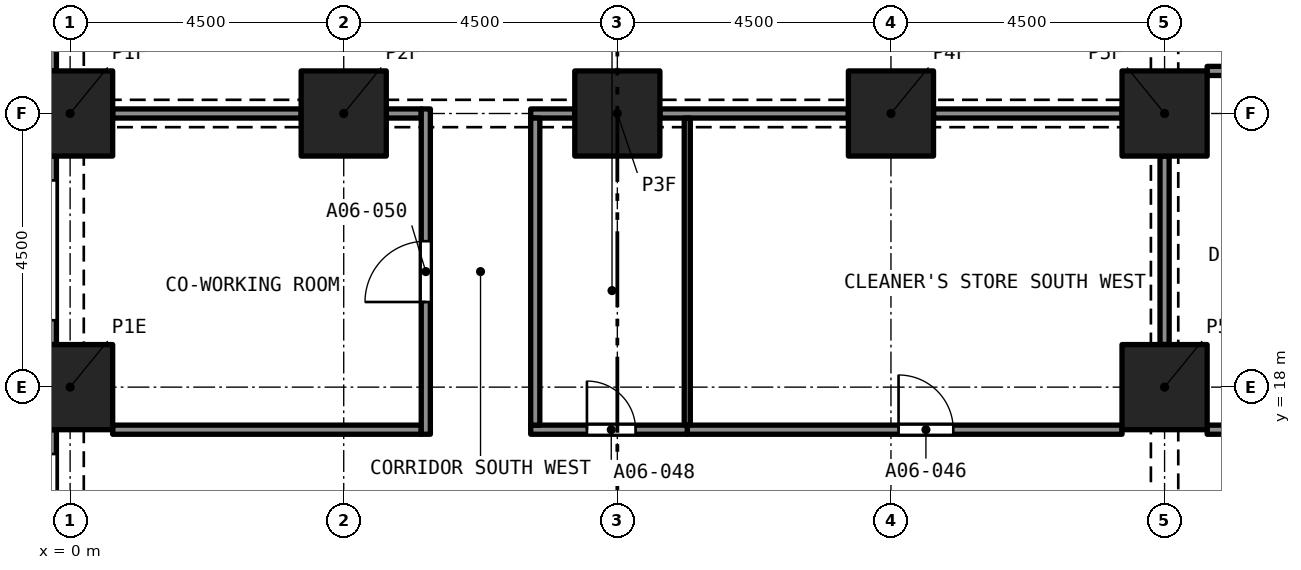
"""IFC4 building model, lengths in metres.
Left out: names, types, materials, properties, quantities, classifications, styles, units other than length and angle.
Written with IfcOpenShell. Run it as: python <this file> out.ifc"""

import sys

from ifc_helpers import new_model, si_unit, direction, frame, frame_2d, origin, origin_2d, place, context, subcontext, project, spatial, rectangle, extrude, element, fill, save


model = new_model("IFC4")
c1 = context("Model", 3, precision=1e-05, world=origin(), true_north=direction((0.0, 1.0)))
c2 = subcontext(c1, "Body", "Model", "MODEL_VIEW")
j1 = project(units=[si_unit("LENGTHUNIT", "METRE"), si_unit("PLANEANGLEUNIT", "RADIAN")], contexts=[c1])
p1 = place(None, origin())
s1 = spatial("IfcSite", under=j1, at=p1, CompositionType="ELEMENT")
p2 = place(p1, origin())
s2 = spatial("IfcBuilding", under=s1, at=p2, CompositionType="ELEMENT")
p3 = place(p2, frame((0.0, 0.0, 30.4)))
s3 = spatial("IfcBuildingStorey", under=s2, at=p3, CompositionType="ELEMENT", Elevation=30.4)
for number, where, z_axis, x_axis in (
    (1, (0.0, 18.0, 0.0), (0.0, 0.0, 1.0), (1.0, 0.0, 0.0)),
    (2, (18.0, 18.0, 0.0), (0.0, 0.0, 1.0), (1.0, 0.0, 0.0)),
    (3, (0.0, 22.5, 0.0), (0.0, 0.0, 1.0), (1.0, 0.0, 0.0)),
    (4, (4.5, 22.5, 0.0), (0.0, 0.0, 1.0), (1.0, 0.0, 0.0)),
    (5, (9.0, 22.5, 0.0), (0.0, 0.0, 1.0), (1.0, 0.0, 0.0)),
    (6, (13.5, 22.5, 0.0), (0.0, 0.0, 1.0), (1.0, 0.0, 0.0)),
    (7, (18.0, 22.5, 0.0), (0.0, 0.0, 1.0), (1.0, 0.0, 0.0)),
):
    element("IfcColumn", number, at=place(p3, frame(where, z_axis=z_axis, x_axis=x_axis)), inside=s3, PredefinedType="COLUMN", context=c2, shape_type="SweptSolid", body=[
        extrude(rectangle(XDim=1.4, YDim=1.4, at=origin_2d()), origin(), (0.0, 0.0, 1.0), 3.2),
    ])
p4 = place(p3, frame((-0.375, 23.2, 0.0), z_axis=(0.0, 0.0, 1.0), x_axis=(0.0, 1.0, 0.0)))
e8 = element("IfcWall", 8, at=p4, inside=s3, PredefinedType="SOLIDWALL", context=c2, shape_type="SweptSolid", body=[
    extrude(rectangle(XDim=3.1, YDim=0.3, at=frame_2d((1.55, 0.0))), origin(), (0.0, 0.0, 1.0), 3.2),
])
p5 = place(p4, frame((0.4, 0.0, 0.45)))
e9 = element("IfcOpeningElement", 9, at=p5, cuts=e8, PredefinedType="OPENING", context=c2, shape_type="SweptSolid", body=[
    extrude(rectangle(XDim=2.3, YDim=1.95, at=frame_2d((1.15, 0.975))), frame((0.0, 0.16, 0.0), z_axis=(0.0, -1.0, 0.0), x_axis=(1.0, 0.0, 0.0)), (0.0, 0.0, 1.0), 0.32),
])
p6 = place(p3, frame((-0.375, 18.7, 0.0), z_axis=(0.0, 0.0, 1.0), x_axis=(0.0, 1.0, 0.0)))
e10 = element("IfcWall", 10, at=p6, inside=s3, PredefinedType="SOLIDWALL", context=c2, shape_type="SweptSolid", body=[
    extrude(rectangle(XDim=3.1, YDim=0.3, at=frame_2d((1.55, 0.0))), origin(), (0.0, 0.0, 1.0), 3.2),
])
p7 = place(p6, frame((0.4, 0.0, 0.45)))
e11 = element("IfcOpeningElement", 11, at=p7, cuts=e10, PredefinedType="OPENING", context=c2, shape_type="SweptSolid", body=[
    extrude(rectangle(XDim=2.3, YDim=1.95, at=frame_2d((1.15, 0.975))), frame((0.0, 0.16, 0.0), z_axis=(0.0, -1.0, 0.0), x_axis=(1.0, 0.0, 0.0)), (0.0, 0.0, 1.0), 0.32),
])
p8 = place(p3, frame((-0.375, 14.2, 0.0), z_axis=(0.0, 0.0, 1.0), x_axis=(0.0, 1.0, 0.0)))
e12 = element("IfcWall", 12, at=p8, inside=s3, PredefinedType="SOLIDWALL", context=c2, shape_type="SweptSolid", body=[
    extrude(rectangle(XDim=3.1, YDim=0.3, at=frame_2d((1.55, 0.0))), origin(), (0.0, 0.0, 1.0), 3.2),
])
p9 = place(p8, frame((0.4, 0.0, 0.45)))
e13 = element("IfcOpeningElement", 13, at=p9, cuts=e12, PredefinedType="OPENING", context=c2, shape_type="SweptSolid", body=[
    extrude(rectangle(XDim=2.3, YDim=1.95, at=frame_2d((1.15, 0.975))), frame((0.0, 0.16, 0.0), z_axis=(0.0, -1.0, 0.0), x_axis=(1.0, 0.0, 0.0)), (0.0, 0.0, 1.0), 0.32),
])
p10 = place(p3, frame((18.7, 17.3, 0.0), z_axis=(0.0, 0.0, 1.0), x_axis=(1.0, 0.0, 0.0)))
e14 = element("IfcWall", 14, at=p10, inside=s3, PredefinedType="PARTITIONING", context=c2, shape_type="SweptSolid", body=[
    extrude(rectangle(XDim=5.075, YDim=0.15, at=frame_2d((2.538, 0.0))), origin(), (0.0, 0.0, 1.0), 2.75),
])
p11 = place(p3, frame((10.15, 17.3, 0.0), z_axis=(0.0, 0.0, 1.0), x_axis=(1.0, 0.0, 0.0)))
e15 = element("IfcWall", 15, at=p11, inside=s3, PredefinedType="PARTITIONING", context=c2, shape_type="SweptSolid", body=[
    extrude(rectangle(XDim=7.15, YDim=0.15, at=frame_2d((3.575, 0.0))), origin(), (0.0, 0.0, 1.0), 2.9),
])
p12 = place(p11, frame((3.475, 0.0, 0.0)))
e16 = element("IfcOpeningElement", 16, at=p12, cuts=e15, PredefinedType="OPENING", context=c2, shape_type="SweptSolid", body=[
    extrude(rectangle(XDim=0.9, YDim=2.1, at=frame_2d((0.45, 1.05))), frame((0.0, 0.085, 0.0), z_axis=(0.0, -1.0, 0.0), x_axis=(1.0, 0.0, 0.0)), (0.0, 0.0, 1.0), 0.17),
])
p13 = place(p3, frame((7.575, 17.3, 0.0), z_axis=(0.0, 0.0, 1.0), x_axis=(1.0, 0.0, 0.0)))
e17 = element("IfcWall", 17, at=p13, inside=s3, PredefinedType="PARTITIONING", context=c2, shape_type="SweptSolid", body=[
    extrude(rectangle(XDim=2.575, YDim=0.15, at=frame_2d((1.288, 0.0))), origin(), (0.0, 0.0, 1.0), 2.9),
])
p14 = place(p13, frame((0.925, 0.0, 0.0)))
e18 = element("IfcOpeningElement", 18, at=p14, cuts=e17, PredefinedType="OPENING", context=c2, shape_type="SweptSolid", body=[
    extrude(rectangle(XDim=0.8, YDim=2.1, at=frame_2d((0.4, 1.05))), frame((0.0, 0.085, 0.0), z_axis=(0.0, -1.0, 0.0), x_axis=(1.0, 0.0, 0.0)), (0.0, 0.0, 1.0), 0.17),
])
p15 = place(p3, frame((0.7, 17.3, 0.0), z_axis=(0.0, 0.0, 1.0), x_axis=(1.0, 0.0, 0.0)))
e19 = element("IfcWall", 19, at=p15, inside=s3, PredefinedType="PARTITIONING", context=c2, shape_type="SweptSolid", body=[
    extrude(rectangle(XDim=5.075, YDim=0.15, at=frame_2d((2.538, 0.0))), origin(), (0.0, 0.0, 1.0), 2.9),
])
p16 = place(p3, frame((18.7, 23.2, 0.0), z_axis=(0.0, 0.0, 1.0), x_axis=(1.0, 0.0, 0.0)))
e20 = element("IfcWall", 20, at=p16, inside=s3, PredefinedType="PARTITIONING", context=c2, shape_type="SweptSolid", body=[
    extrude(rectangle(XDim=5.075, YDim=0.15, at=frame_2d((2.538, 0.0))), origin(), (0.0, 0.0, 1.0), 2.75),
])
for number, where, z_axis, x_axis in (
    (21, (18.0, 18.7, 0.0), (0.0, 0.0, 1.0), (0.0, 1.0, 0.0)),
    (22, (14.2, 22.5, 0.0), (0.0, 0.0, 1.0), (1.0, 0.0, 0.0)),
    (23, (9.7, 22.5, 0.0), (0.0, 0.0, 1.0), (1.0, 0.0, 0.0)),
):
    element("IfcWall", number, at=place(p3, frame(where, z_axis=z_axis, x_axis=x_axis)), inside=s3, PredefinedType="PARTITIONING", context=c2, shape_type="SweptSolid", body=[
        extrude(rectangle(XDim=3.1, YDim=0.15, at=frame_2d((1.55, 0.0))), origin(), (0.0, 0.0, 1.0), 2.38),
    ])
p17 = place(p3, frame((7.575, 22.5, 0.0), z_axis=(0.0, 0.0, 1.0), x_axis=(1.0, 0.0, 0.0)))
e24 = element("IfcWall", 24, at=p17, inside=s3, PredefinedType="PARTITIONING", context=c2, shape_type="SweptSolid", body=[
    extrude(rectangle(XDim=0.725, YDim=0.15, at=frame_2d((0.363, 0.0))), origin(), (0.0, 0.0, 1.0), 2.38),
])
p18 = place(p3, frame((5.2, 22.5, 0.0), z_axis=(0.0, 0.0, 1.0), x_axis=(1.0, 0.0, 0.0)))
e25 = element("IfcWall", 25, at=p18, inside=s3, PredefinedType="PARTITIONING", context=c2, shape_type="SweptSolid", body=[
    extrude(rectangle(XDim=0.575, YDim=0.15, at=frame_2d((0.288, 0.0))), origin(), (0.0, 0.0, 1.0), 2.38),
])
p19 = place(p3, frame((0.7, 22.5, 0.0), z_axis=(0.0, 0.0, 1.0), x_axis=(1.0, 0.0, 0.0)))
e26 = element("IfcWall", 26, at=p19, inside=s3, PredefinedType="PARTITIONING", context=c2, shape_type="SweptSolid", body=[
    extrude(rectangle(XDim=3.1, YDim=0.15, at=frame_2d((1.55, 0.0))), origin(), (0.0, 0.0, 1.0), 2.38),
])
p20 = place(p3, frame((7.65, 17.375, 0.0), z_axis=(0.0, 0.0, 1.0), x_axis=(0.0, 1.0, 0.0)))
e27 = element("IfcWall", 27, at=p20, inside=s3, PredefinedType="PARTITIONING", context=c2, shape_type="SweptSolid", body=[
    extrude(rectangle(XDim=5.05, YDim=0.15, at=frame_2d((2.525, 0.0))), origin(), (0.0, 0.0, 1.0), 2.9),
])
p21 = place(p3, frame((5.85, 17.225, 0.0), z_axis=(0.0, 0.0, 1.0), x_axis=(0.0, 1.0, 0.0)))
e28 = element("IfcWall", 28, at=p21, inside=s3, PredefinedType="PARTITIONING", context=c2, shape_type="SweptSolid", body=[
    extrude(rectangle(XDim=5.35, YDim=0.15, at=frame_2d((2.675, 0.0))), origin(), (0.0, 0.0, 1.0), 2.9),
])
p22 = place(p21, frame((2.175, 0.0, 0.0)))
e29 = element("IfcOpeningElement", 29, at=p22, cuts=e28, PredefinedType="OPENING", context=c2, shape_type="SweptSolid", body=[
    extrude(rectangle(XDim=1.0, YDim=2.1, at=frame_2d((0.5, 1.05))), frame((0.0, 0.085, 0.0), z_axis=(0.0, -1.0, 0.0), x_axis=(1.0, 0.0, 0.0)), (0.0, 0.0, 1.0), 0.17),
])
p23 = place(p3, frame((10.15, 17.375, 0.0), z_axis=(0.0, 0.0, 1.0), x_axis=(0.0, 1.0, 0.0)))
e30 = element("IfcWall", 30, at=p23, inside=s3, PredefinedType="PARTITIONING", context=c2, shape_type="SweptSolid", body=[
    extrude(rectangle(XDim=5.05, YDim=0.1, at=frame_2d((2.525, 0.0))), origin(), (0.0, 0.0, 1.0), 2.9),
])
p24 = place(p12, origin())
e31 = element("IfcDoor", 31, at=p24, inside=s3, OperationType="SINGLE_SWING_RIGHT", PredefinedType="DOOR", context=c2, shape_type="SweptSolid", body=[
    extrude(rectangle(XDim=0.9, YDim=2.1, at=frame_2d((0.45, 1.05))), frame((0.0, 0.025, 0.0), z_axis=(0.0, -1.0, 0.0), x_axis=(1.0, 0.0, 0.0)), (0.0, 0.0, 1.0), 0.05),
])
fill(e16, e31)
p25 = place(p14, origin())
e32 = element("IfcDoor", 32, at=p25, inside=s3, OperationType="SINGLE_SWING_RIGHT", PredefinedType="DOOR", context=c2, shape_type="SweptSolid", body=[
    extrude(rectangle(XDim=0.8, YDim=2.1, at=frame_2d((0.4, 1.05))), frame((0.0, 0.025, 0.0), z_axis=(0.0, -1.0, 0.0), x_axis=(1.0, 0.0, 0.0)), (0.0, 0.0, 1.0), 0.05),
])
fill(e18, e32)
p26 = place(p22, origin())
e33 = element("IfcDoor", 33, at=p26, inside=s3, OperationType="SINGLE_SWING_LEFT", PredefinedType="DOOR", context=c2, shape_type="SweptSolid", body=[
    extrude(rectangle(XDim=1.0, YDim=2.1, at=frame_2d((0.5, 1.05))), frame((0.0, 0.025, 0.0), z_axis=(0.0, -1.0, 0.0), x_axis=(1.0, 0.0, 0.0)), (0.0, 0.0, 1.0), 0.05),
])
fill(e29, e33)
save(model, sys.argv[1])
